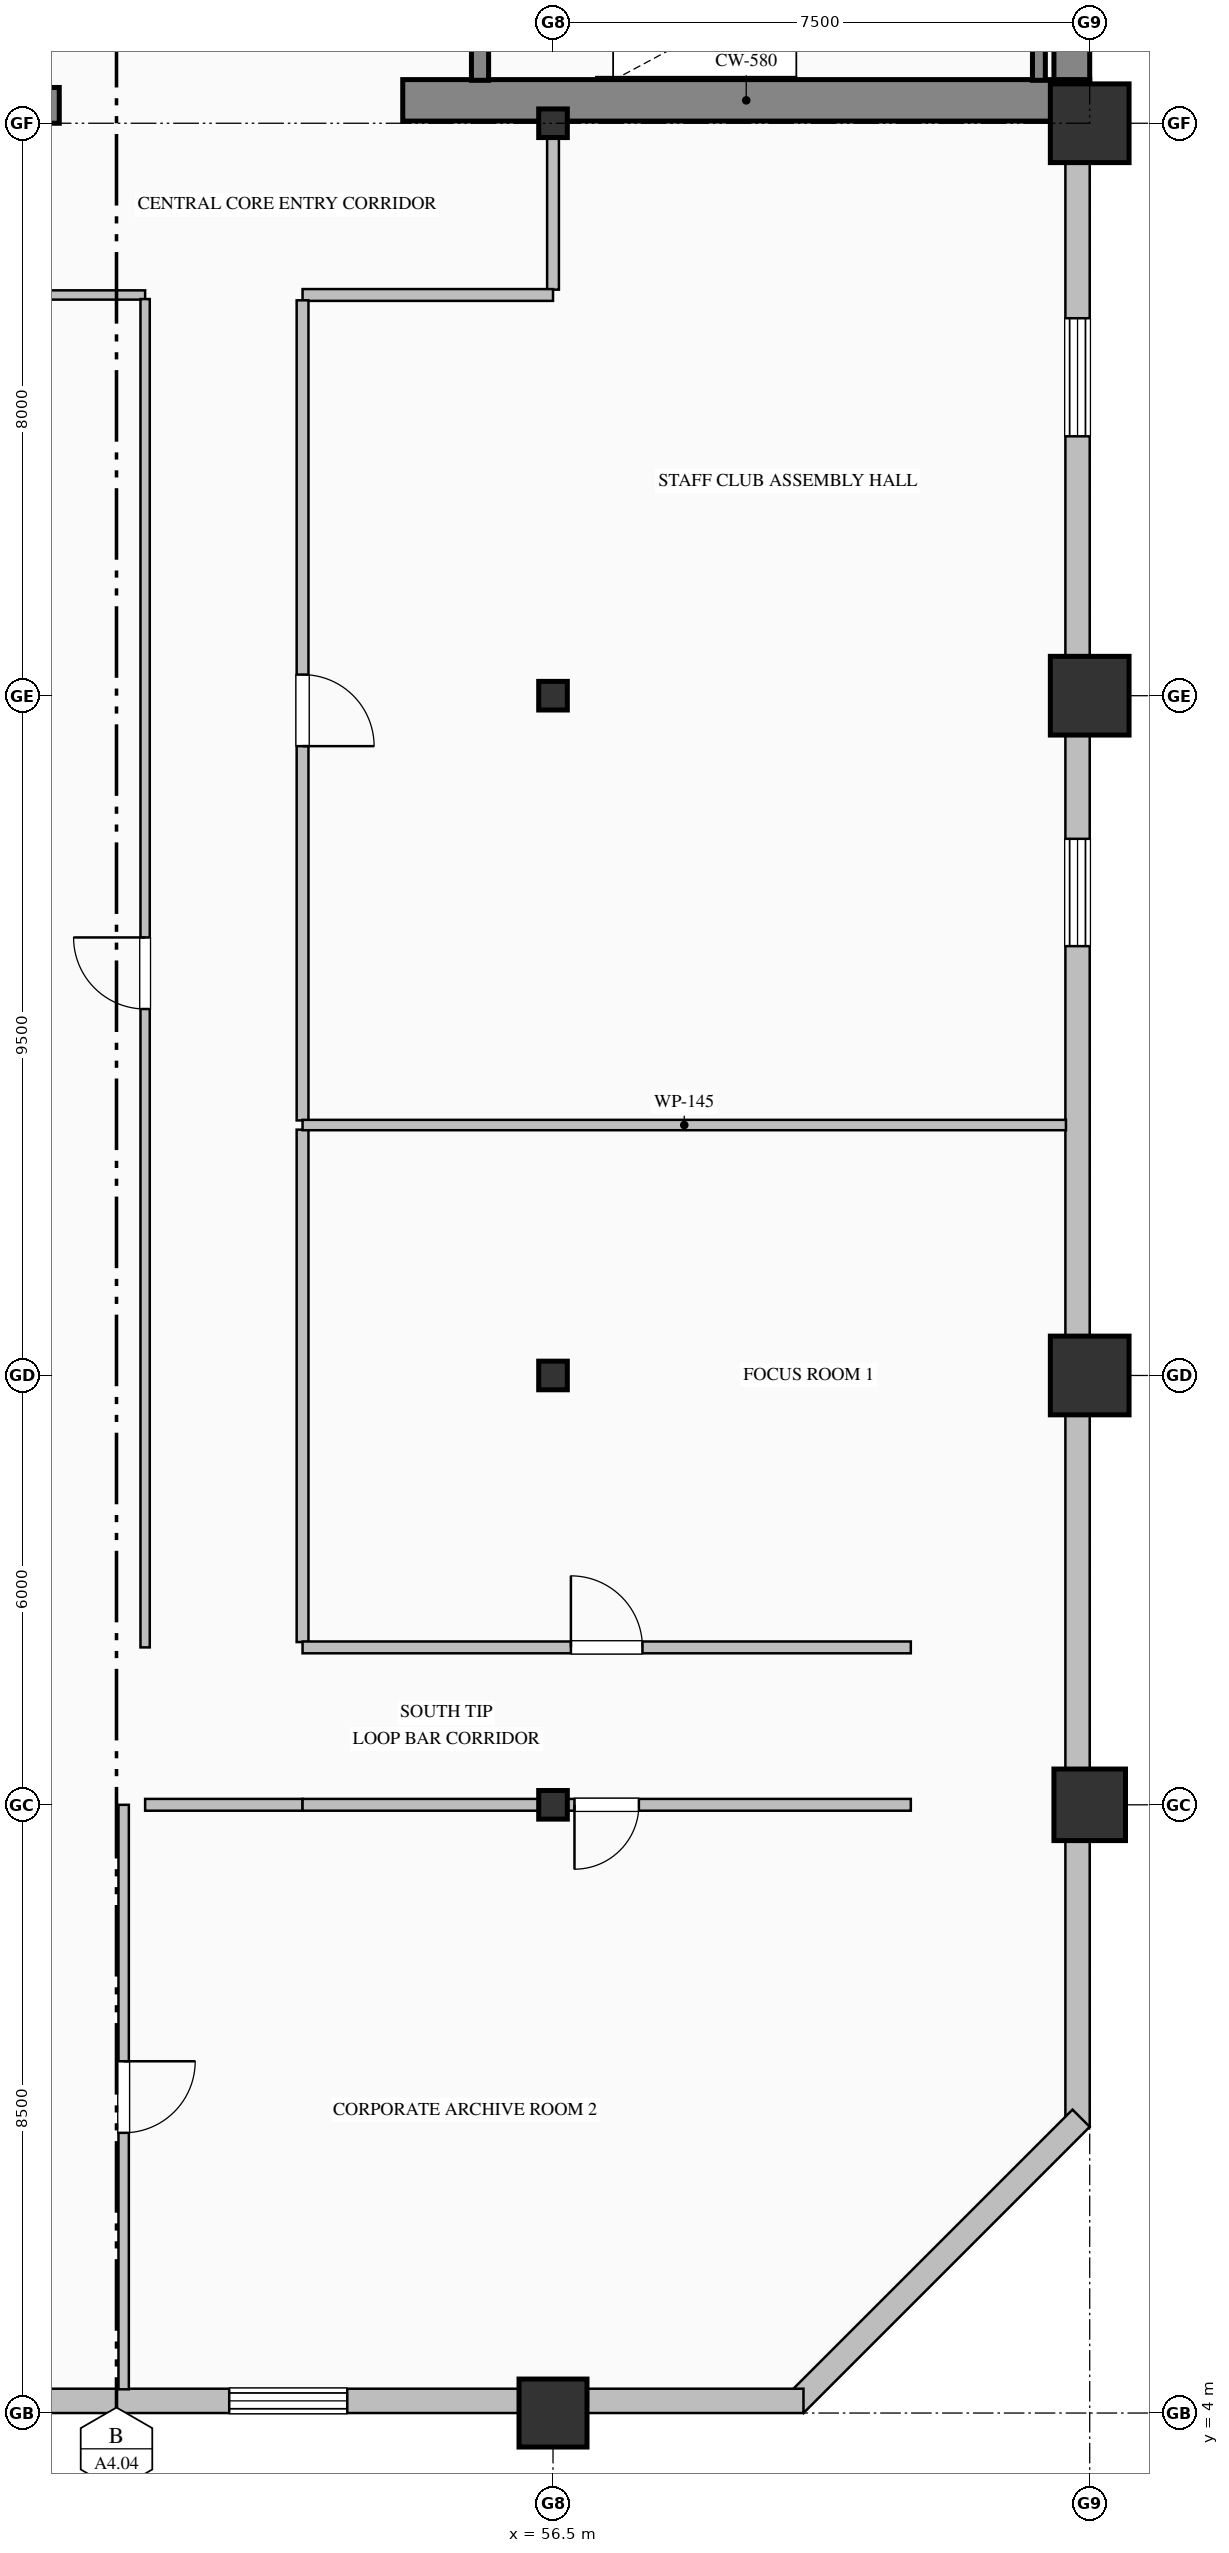
"""IFC4 building model, lengths in metres.
Left out: names, types, materials, properties, quantities, classifications, styles, units other than length and angle.
Written with IfcOpenShell. Run it as: python <this file> out.ifc"""

import sys

from ifc_helpers import new_model, si_unit, direction, frame, frame_2d, origin, origin_2d, place, context, subcontext, project, spatial, rectangle, hollow_rectangle, hollow_circle, i_section, extrude, element, fill, save


model = new_model("IFC4")
c1 = context("Model", 3, precision=1e-05, world=origin(), true_north=direction((0.0, 1.0)))
c2 = subcontext(c1, "Body", "Model", "MODEL_VIEW")
j1 = project(units=[si_unit("LENGTHUNIT", "METRE"), si_unit("PLANEANGLEUNIT", "RADIAN")], contexts=[c1])
p1 = place(None, origin())
s1 = spatial("IfcSite", under=j1, at=p1, CompositionType="ELEMENT")
p2 = place(p1, origin())
s2 = spatial("IfcBuilding", under=s1, at=p2, CompositionType="ELEMENT")
p3 = place(p2, frame((0.0, 0.0, 143.0)))
s3 = spatial("IfcBuildingStorey", under=s2, at=p3, CompositionType="ELEMENT", Elevation=143.0)
p4 = place(p3, frame((63.75, 36.32, 0.0), z_axis=(0.0, 0.0, 1.0), x_axis=(0.0, 1.0, 0.0)))
e1 = element("IfcWall", 1, at=p4, inside=s3, PredefinedType="SHEAR", context=c2, shape_type="SweptSolid", body=[
    extrude(rectangle(XDim=15.18, YDim=0.5, at=frame_2d((7.59, 0.0))), origin(), (0.0, 0.0, 1.0), 3.765),
])
p5 = place(p3, frame((40.5, 36.25, 0.0), z_axis=(0.0, 0.0, 1.0), x_axis=(1.0, 0.0, 0.0)))
e2 = element("IfcWall", 2, at=p5, inside=s3, PredefinedType="SHEAR", context=c2, shape_type="SweptSolid", body=[
    extrude(rectangle(XDim=9.1, YDim=0.5, at=frame_2d((4.55, 0.0))), origin(), (0.0, 0.0, 1.0), 3.765),
])
p6 = place(p3, frame((54.4, 36.32, 0.0), z_axis=(0.0, 0.0, 1.0), x_axis=(1.0, 0.0, 0.0)))
e3 = element("IfcWall", 3, at=p6, inside=s3, PredefinedType="SHEAR", context=c2, shape_type="SweptSolid", body=[
    extrude(rectangle(XDim=9.6, YDim=0.58, at=frame_2d((4.8, 0.0))), origin(), (0.0, 0.0, 1.0), 4.0),
])
p7 = place(p3, frame((56.5, 4.0, 0.0), z_axis=(0.0, 0.0, 1.0), x_axis=(1.0, 0.0, 0.0)))
e4 = element("IfcColumn", 4, at=p7, inside=s3, PredefinedType="COLUMN", context=c2, shape_type="SweptSolid", body=[
    extrude(hollow_rectangle(XDim=0.95, YDim=0.95, WallThickness=0.036, at=origin_2d()), origin(), (0.0, 0.0, 1.0), 4.0),
])
for number, where, z_axis, x_axis in (
    (5, (56.5, 12.5, 0.0), (0.0, 0.0, 1.0), (1.0, 0.0, 0.0)),
    (6, (56.5, 18.5, 0.0), (0.0, 0.0, 1.0), (1.0, 0.0, 0.0)),
    (7, (56.5, 28.0, 0.0), (0.0, 0.0, 1.0), (1.0, 0.0, 0.0)),
    (8, (56.5, 36.0, 0.0), (0.0, 0.0, 1.0), (1.0, 0.0, 0.0)),
):
    element("IfcColumn", number, at=place(p3, frame(where, z_axis=z_axis, x_axis=x_axis)), inside=s3, PredefinedType="COLUMN", context=c2, shape_type="SweptSolid", body=[
        extrude(i_section(OverallWidth=0.4, OverallDepth=0.4, WebThickness=0.013, FlangeThickness=0.021, FilletRadius=0.022, at=origin_2d()), origin(), (0.0, 0.0, 1.0), 4.0),
    ])
p8 = place(p3, frame((64.0, 12.5, 0.0), z_axis=(0.0, 0.0, 1.0), x_axis=(1.0, 0.0, 0.0)))
e9 = element("IfcColumn", 9, at=p8, inside=s3, PredefinedType="COLUMN", context=c2, shape_type="SweptSolid", body=[
    extrude(hollow_circle(Radius=0.5, WallThickness=0.036, at=origin_2d()), origin(), (0.0, 0.0, 1.0), 4.0),
])
for number, where, z_axis, x_axis in (
    (10, (64.0, 18.5, 0.0), (0.0, 0.0, 1.0), (1.0, 0.0, 0.0)),
    (11, (64.0, 28.0, 0.0), (0.0, 0.0, 1.0), (1.0, 0.0, 0.0)),
    (12, (64.0, 36.0, 0.0), (0.0, 0.0, 1.0), (1.0, 0.0, 0.0)),
):
    element("IfcColumn", number, at=place(p3, frame(where, z_axis=z_axis, x_axis=x_axis)), inside=s3, PredefinedType="COLUMN", context=c2, shape_type="SweptSolid", body=[
        extrude(hollow_rectangle(XDim=1.1, YDim=1.1, WallThickness=0.04, at=origin_2d()), origin(), (0.0, 0.0, 1.0), 4.0),
    ])
p9 = place(p3, frame((63.83, 36.05, 0.0), z_axis=(0.0, 0.0, 1.0), x_axis=(0.0, -1.0, 0.0)))
e13 = element("IfcWall", 13, at=p9, inside=s3, PredefinedType="SOLIDWALL", context=c2, shape_type="SweptSolid", body=[
    extrude(rectangle(XDim=28.05, YDim=0.34, at=frame_2d((14.025, 0.0))), origin(), (0.0, 0.0, 1.0), 3.265),
])
p10 = place(p9, frame((2.775, 0.0, 0.85)))
e14 = element("IfcOpeningElement", 14, at=p10, cuts=e13, PredefinedType="OPENING", context=c2, shape_type="SweptSolid", body=[
    extrude(rectangle(XDim=1.65, YDim=1.95, at=frame_2d((0.825, 0.975))), frame((0.0, 0.18, 0.0), z_axis=(0.0, -1.0, 0.0), x_axis=(1.0, 0.0, 0.0)), (0.0, 0.0, 1.0), 0.36),
])
p11 = place(p9, frame((10.05, 0.0, 0.85)))
e15 = element("IfcOpeningElement", 15, at=p11, cuts=e13, PredefinedType="OPENING", context=c2, shape_type="SweptSolid", body=[
    extrude(rectangle(XDim=1.5, YDim=1.95, at=frame_2d((0.75, 0.975))), frame((0.0, 0.18, 0.0), z_axis=(0.0, -1.0, 0.0), x_axis=(1.0, 0.0, 0.0)), (0.0, 0.0, 1.0), 0.36),
])
p12 = place(p3, frame((63.88, 8.12, 0.0), z_axis=(0.0, 0.0, 1.0), x_axis=(-0.707106781187, -0.707106781187, 0.0)))
e16 = element("IfcWall", 16, at=p12, inside=s3, PredefinedType="SOLIDWALL", context=c2, shape_type="SweptSolid", body=[
    extrude(rectangle(XDim=5.657, YDim=0.34, at=frame_2d((2.828, 0.0))), origin(), (0.0, 0.0, 1.0), 3.765),
])
p13 = place(p3, frame((60.0, 4.17, 0.0), z_axis=(0.0, 0.0, 1.0), x_axis=(-1.0, 0.0, 0.0)))
e17 = element("IfcWall", 17, at=p13, inside=s3, PredefinedType="SOLIDWALL", context=c2, shape_type="SweptSolid", body=[
    extrude(rectangle(XDim=15.5, YDim=0.34, at=frame_2d((7.75, 0.0))), origin(), (0.0, 0.0, 1.0), 3.265),
])
p14 = place(p13, frame((6.375, 0.0, 0.85)))
e18 = element("IfcOpeningElement", 18, at=p14, cuts=e17, PredefinedType="OPENING", context=c2, shape_type="SweptSolid", body=[
    extrude(rectangle(XDim=1.65, YDim=1.95, at=frame_2d((0.825, 0.975))), frame((0.0, 0.18, 0.0), z_axis=(0.0, -1.0, 0.0), x_axis=(1.0, 0.0, 0.0)), (0.0, 0.0, 1.0), 0.36),
])
p15 = place(p3, frame((55.48, 39.75, 0.0), z_axis=(0.0, 0.0, 1.0), x_axis=(0.0, -1.0, 0.0)))
e19 = element("IfcWall", 19, at=p15, inside=s3, PredefinedType="SOLIDWALL", context=c2, shape_type="SweptSolid", body=[
    extrude(rectangle(XDim=3.15, YDim=0.24, at=frame_2d((1.575, 0.0))), origin(), (0.0, 0.0, 1.0), 4.0),
])
p16 = place(p15, frame((1.0, 0.0, 0.0)))
e20 = element("IfcOpeningElement", 20, at=p16, cuts=e19, PredefinedType="OPENING", context=c2, shape_type="SweptSolid", body=[
    extrude(rectangle(XDim=1.15, YDim=2.2, at=frame_2d((0.575, 1.1))), frame((0.0, 0.13, 0.0), z_axis=(0.0, -1.0, 0.0), x_axis=(1.0, 0.0, 0.0)), (0.0, 0.0, 1.0), 0.26),
])
p17 = place(p3, frame((63.29, 36.6, 0.0), z_axis=(0.0, 0.0, 1.0), x_axis=(0.0, 1.0, 0.0)))
e21 = element("IfcWall", 21, at=p17, inside=s3, PredefinedType="SOLIDWALL", context=c2, shape_type="SweptSolid", body=[
    extrude(rectangle(XDim=3.15, YDim=0.18, at=frame_2d((1.575, 0.0))), origin(), (0.0, 0.0, 1.0), 4.0),
])
p18 = place(p3, frame((56.5, 36.0, 0.0), z_axis=(0.0, 0.0, 1.0), x_axis=(0.0, -1.0, 0.0)))
e22 = element("IfcWall", 22, at=p18, inside=s3, PredefinedType="PARTITIONING", context=c2, shape_type="SweptSolid", body=[
    extrude(rectangle(XDim=2.325, YDim=0.165, at=frame_2d((1.163, 0.0))), origin(), (0.0, 0.0, 1.0), 3.157),
])
p19 = place(p3, frame((56.5, 33.6, 0.0), z_axis=(0.0, 0.0, 1.0), x_axis=(-1.0, 0.0, 0.0)))
e23 = element("IfcWall", 23, at=p19, inside=s3, PredefinedType="PARTITIONING", context=c2, shape_type="SweptSolid", body=[
    extrude(rectangle(XDim=3.5, YDim=0.165, at=frame_2d((1.75, 0.0))), origin(), (0.0, 0.0, 1.0), 3.765),
])
p20 = place(p3, frame((50.8, 33.6, 0.0), z_axis=(0.0, 0.0, 1.0), x_axis=(-1.0, 0.0, 0.0)))
e24 = element("IfcWall", 24, at=p20, inside=s3, PredefinedType="PARTITIONING", context=c2, shape_type="SweptSolid", body=[
    extrude(rectangle(XDim=10.3, YDim=0.13, at=frame_2d((5.15, 0.0))), origin(), (0.0, 0.0, 1.0), 3.765),
])
p21 = place(p3, frame((53.0, 33.525, 0.0), z_axis=(0.0, 0.0, 1.0), x_axis=(0.0, -1.0, 0.0)))
e25 = element("IfcWall", 25, at=p21, inside=s3, PredefinedType="PARTITIONING", context=c2, shape_type="SweptSolid", body=[
    extrude(rectangle(XDim=11.461, YDim=0.165, at=frame_2d((5.73, 0.0))), origin(), (0.0, 0.0, 1.0), 3.765),
])
p22 = place(p21, frame((5.23, 0.0, 0.0)))
e26 = element("IfcOpeningElement", 26, at=p22, cuts=e25, PredefinedType="OPENING", context=c2, shape_type="SweptSolid", body=[
    extrude(rectangle(XDim=1.0, YDim=2.15, at=frame_2d((0.5, 1.075))), frame((0.0, 0.093, 0.0), z_axis=(0.0, -1.0, 0.0), x_axis=(1.0, 0.0, 0.0)), (0.0, 0.0, 1.0), 0.185),
])
p23 = place(p3, frame((53.0, 21.936, 0.0), z_axis=(0.0, 0.0, 1.0), x_axis=(0.0, -1.0, 0.0)))
e27 = element("IfcWall", 27, at=p23, inside=s3, PredefinedType="PARTITIONING", context=c2, shape_type="SweptSolid", body=[
    extrude(rectangle(XDim=7.161, YDim=0.165, at=frame_2d((3.581, 0.0))), origin(), (0.0, 0.0, 1.0), 3.765),
])
p24 = place(p3, frame((50.8, 14.7, 0.0), z_axis=(0.0, 0.0, 1.0), x_axis=(0.0, 1.0, 0.0)))
e28 = element("IfcWall", 28, at=p24, inside=s3, PredefinedType="PARTITIONING", context=c2, shape_type="SweptSolid", body=[
    extrude(rectangle(XDim=18.843, YDim=0.13, at=frame_2d((9.421, 0.0))), origin(), (0.0, 0.0, 1.0), 3.765),
])
p25 = place(p24, frame((8.921, 0.0, 0.0)))
e29 = element("IfcOpeningElement", 29, at=p25, cuts=e28, PredefinedType="OPENING", context=c2, shape_type="SweptSolid", body=[
    extrude(rectangle(XDim=1.0, YDim=2.15, at=frame_2d((0.5, 1.075))), frame((0.0, 0.075, 0.0), z_axis=(0.0, -1.0, 0.0), x_axis=(1.0, 0.0, 0.0)), (0.0, 0.0, 1.0), 0.15),
])
p26 = place(p3, frame((53.0, 12.5, 0.0), z_axis=(0.0, 0.0, 1.0), x_axis=(-1.0, 0.0, 0.0)))
e30 = element("IfcWall", 30, at=p26, inside=s3, PredefinedType="PARTITIONING", context=c2, shape_type="SweptSolid", body=[
    extrude(rectangle(XDim=2.2, YDim=0.165, at=frame_2d((1.1, 0.0))), origin(), (0.0, 0.0, 1.0), 3.157),
])
p27 = place(p3, frame((53.0, 14.7, 0.0), z_axis=(0.0, 0.0, 1.0), x_axis=(1.0, 0.0, 0.0)))
e31 = element("IfcWall", 31, at=p27, inside=s3, PredefinedType="PARTITIONING", context=c2, shape_type="SweptSolid", body=[
    extrude(rectangle(XDim=8.5, YDim=0.165, at=frame_2d((4.25, 0.0))), origin(), (0.0, 0.0, 1.0), 3.765),
])
p28 = place(p27, frame((3.75, 0.0, 0.0)))
e32 = element("IfcOpeningElement", 32, at=p28, cuts=e31, PredefinedType="OPENING", context=c2, shape_type="SweptSolid", body=[
    extrude(rectangle(XDim=1.0, YDim=2.15, at=frame_2d((0.5, 1.075))), frame((0.0, 0.093, 0.0), z_axis=(0.0, -1.0, 0.0), x_axis=(1.0, 0.0, 0.0)), (0.0, 0.0, 1.0), 0.185),
])
p29 = place(p3, frame((61.5, 12.5, 0.0), z_axis=(0.0, 0.0, 1.0), x_axis=(-1.0, 0.0, 0.0)))
e33 = element("IfcWall", 33, at=p29, inside=s3, PredefinedType="PARTITIONING", context=c2, shape_type="SweptSolid", body=[
    extrude(rectangle(XDim=8.5, YDim=0.165, at=frame_2d((4.25, 0.0))), origin(), (0.0, 0.0, 1.0), 3.157),
])
p30 = place(p29, frame((3.8, 0.0, 0.0)))
e34 = element("IfcOpeningElement", 34, at=p30, cuts=e33, PredefinedType="OPENING", context=c2, shape_type="SweptSolid", body=[
    extrude(rectangle(XDim=0.9, YDim=2.15, at=frame_2d((0.45, 1.075))), frame((0.0, 0.093, 0.0), z_axis=(0.0, -1.0, 0.0), x_axis=(1.0, 0.0, 0.0)), (0.0, 0.0, 1.0), 0.185),
])
p31 = place(p3, frame((63.668, 22.0, 0.0), z_axis=(0.0, 0.0, 1.0), x_axis=(-1.0, 0.0, 0.0)))
e35 = element("IfcWall", 35, at=p31, inside=s3, PredefinedType="PARTITIONING", context=c2, shape_type="SweptSolid", body=[
    extrude(rectangle(XDim=10.668, YDim=0.145, at=frame_2d((5.334, 0.0))), origin(), (0.0, 0.0, 1.0), 3.765),
])
p32 = place(p3, frame((50.5, 12.5, 0.0), z_axis=(0.0, 0.0, 1.0), x_axis=(0.0, -1.0, 0.0)))
e36 = element("IfcWall", 36, at=p32, inside=s3, PredefinedType="PARTITIONING", context=c2, shape_type="SweptSolid", body=[
    extrude(rectangle(XDim=8.168, YDim=0.145, at=frame_2d((4.084, 0.0))), origin(), (0.0, 0.0, 1.0), 3.765),
])
p33 = place(p32, frame((3.584, 0.0, 0.0)))
e37 = element("IfcOpeningElement", 37, at=p33, cuts=e36, PredefinedType="OPENING", context=c2, shape_type="SweptSolid", body=[
    extrude(rectangle(XDim=1.0, YDim=2.15, at=frame_2d((0.5, 1.075))), frame((0.0, 0.083, 0.0), z_axis=(0.0, -1.0, 0.0), x_axis=(1.0, 0.0, 0.0)), (0.0, 0.0, 1.0), 0.165),
])
p34 = place(p10, origin())
e38 = element("IfcWindow", 38, at=p34, inside=s3, PartitioningType="DOUBLE_PANEL_VERTICAL", PredefinedType="WINDOW", context=c2, shape_type="SweptSolid", body=[
    extrude(rectangle(XDim=1.65, YDim=1.95, at=frame_2d((0.825, 0.975))), frame((0.0, 0.15, 0.0), z_axis=(0.0, -1.0, 0.0), x_axis=(1.0, 0.0, 0.0)), (0.0, 0.0, 1.0), 0.06),
])
fill(e14, e38)
p35 = place(p11, origin())
e39 = element("IfcWindow", 39, at=p35, inside=s3, PartitioningType="DOUBLE_PANEL_VERTICAL", PredefinedType="WINDOW", context=c2, shape_type="SweptSolid", body=[
    extrude(rectangle(XDim=1.5, YDim=1.95, at=frame_2d((0.75, 0.975))), frame((0.0, 0.15, 0.0), z_axis=(0.0, -1.0, 0.0), x_axis=(1.0, 0.0, 0.0)), (0.0, 0.0, 1.0), 0.06),
])
fill(e15, e39)
p36 = place(p14, origin())
e40 = element("IfcWindow", 40, at=p36, inside=s3, PartitioningType="DOUBLE_PANEL_VERTICAL", PredefinedType="WINDOW", context=c2, shape_type="SweptSolid", body=[
    extrude(rectangle(XDim=1.65, YDim=1.95, at=frame_2d((0.825, 0.975))), frame((0.0, 0.15, 0.0), z_axis=(0.0, -1.0, 0.0), x_axis=(1.0, 0.0, 0.0)), (0.0, 0.0, 1.0), 0.06),
])
fill(e18, e40)
p37 = place(p22, origin())
e41 = element("IfcDoor", 41, at=p37, inside=s3, OperationType="SINGLE_SWING_RIGHT", PredefinedType="DOOR", context=c2, shape_type="SweptSolid", body=[
    extrude(rectangle(XDim=1.0, YDim=2.15, at=frame_2d((0.5, 1.075))), frame((0.0, 0.025, 0.0), z_axis=(0.0, -1.0, 0.0), x_axis=(1.0, 0.0, 0.0)), (0.0, 0.0, 1.0), 0.05),
])
fill(e26, e41)
p38 = place(p28, origin())
e42 = element("IfcDoor", 42, at=p38, inside=s3, OperationType="SINGLE_SWING_LEFT", PredefinedType="DOOR", context=c2, shape_type="SweptSolid", body=[
    extrude(rectangle(XDim=1.0, YDim=2.15, at=frame_2d((0.5, 1.075))), frame((0.0, 0.025, 0.0), z_axis=(0.0, -1.0, 0.0), x_axis=(1.0, 0.0, 0.0)), (0.0, 0.0, 1.0), 0.05),
])
fill(e32, e42)
p39 = place(p25, origin())
e43 = element("IfcDoor", 43, at=p39, inside=s3, OperationType="SINGLE_SWING_RIGHT", PredefinedType="DOOR", context=c2, shape_type="SweptSolid", body=[
    extrude(rectangle(XDim=1.0, YDim=2.15, at=frame_2d((0.5, 1.075))), frame((0.0, 0.025, 0.0), z_axis=(0.0, -1.0, 0.0), x_axis=(1.0, 0.0, 0.0)), (0.0, 0.0, 1.0), 0.05),
])
fill(e29, e43)
p40 = place(p33, origin())
e44 = element("IfcDoor", 44, at=p40, inside=s3, OperationType="SINGLE_SWING_LEFT", PredefinedType="DOOR", context=c2, shape_type="SweptSolid", body=[
    extrude(rectangle(XDim=1.0, YDim=2.15, at=frame_2d((0.5, 1.075))), frame((0.0, 0.025, 0.0), z_axis=(0.0, -1.0, 0.0), x_axis=(1.0, 0.0, 0.0)), (0.0, 0.0, 1.0), 0.05),
])
fill(e37, e44)
p41 = place(p30, origin())
e45 = element("IfcDoor", 45, at=p41, inside=s3, OperationType="SINGLE_SWING_RIGHT", PredefinedType="DOOR", context=c2, shape_type="SweptSolid", body=[
    extrude(rectangle(XDim=0.9, YDim=2.15, at=frame_2d((0.45, 1.075))), frame((0.0, 0.025, 0.0), z_axis=(0.0, -1.0, 0.0), x_axis=(1.0, 0.0, 0.0)), (0.0, 0.0, 1.0), 0.05),
])
fill(e34, e45)
save(model, sys.argv[1])
